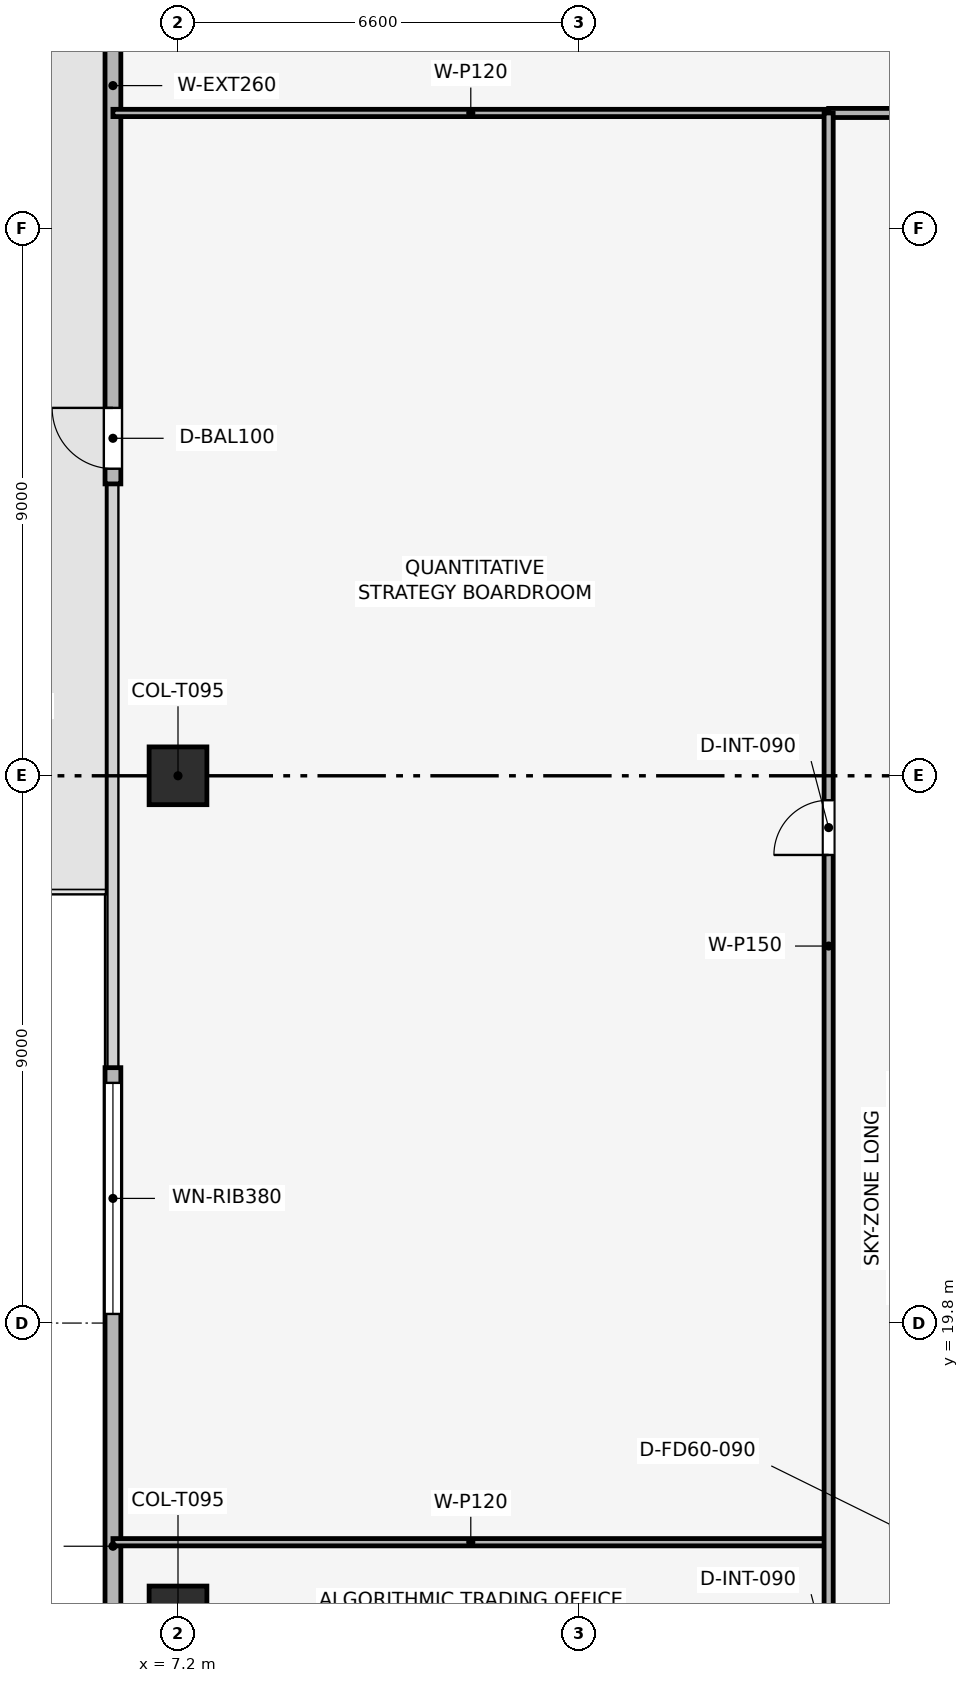
"""IFC4 building model, lengths in metres.
Left out: names, types, materials, properties, quantities, classifications, styles, units other than length and angle.
Written with IfcOpenShell. Run it as: python <this file> out.ifc"""

import sys

from ifc_helpers import new_model, si_unit, direction, frame, frame_2d, origin, origin_2d, place, context, subcontext, project, spatial, rectangle, extrude, element, fill, save


model = new_model("IFC4")
c1 = context("Model", 3, precision=1e-05, world=origin(), true_north=direction((0.0, 1.0)))
c2 = subcontext(c1, "Body", "Model", "MODEL_VIEW")
j1 = project(units=[si_unit("LENGTHUNIT", "METRE"), si_unit("PLANEANGLEUNIT", "RADIAN")], contexts=[c1])
p1 = place(None, origin())
s1 = spatial("IfcSite", under=j1, at=p1, CompositionType="ELEMENT")
p2 = place(p1, origin())
s2 = spatial("IfcBuilding", under=s1, at=p2, CompositionType="ELEMENT")
p3 = place(p2, frame((0.0, 0.0, 325.5)))
s3 = spatial("IfcBuildingStorey", under=s2, at=p3, CompositionType="ELEMENT", Elevation=325.5)
for number, where, z_axis, x_axis in (
    (1, (7.2, 28.8, 0.003), (0.0, 0.0, 1.0), (1.0, 0.0, 0.0)),
    (2, (7.2, 15.0, 0.003), (0.0, 0.0, 1.0), (1.0, 0.0, 0.0)),
):
    element("IfcColumn", number, at=place(p3, frame(where, z_axis=z_axis, x_axis=x_axis)), inside=s3, PredefinedType="COLUMN", context=c2, shape_type="SweptSolid", body=[
        extrude(rectangle(XDim=0.95, YDim=0.95, at=origin_2d()), origin(), (0.0, 0.0, 1.0), 3.504),
    ])
p4 = place(p3, frame((6.13, 12.3, 0.0), z_axis=(0.0, 0.0, 1.0), x_axis=(0.0, 1.0, 0.0)))
e3 = element("IfcWall", 3, at=p4, inside=s3, PredefinedType="SOLIDWALL", context=c2, shape_type="SweptSolid", body=[
    extrude(rectangle(XDim=11.7, YDim=0.26, at=frame_2d((5.85, 0.0))), origin(), (0.0, 0.0, 1.0), 3.51),
])
p5 = place(p4, frame((7.65, 0.0, 0.9)))
e4 = element("IfcOpeningElement", 4, at=p5, cuts=e3, PredefinedType="OPENING", context=c2, shape_type="SweptSolid", body=[
    extrude(rectangle(XDim=3.8, YDim=1.9, at=frame_2d((1.9, 0.95))), frame((0.0, 0.14, 0.0), z_axis=(0.0, -1.0, 0.0), x_axis=(1.0, 0.0, 0.0)), (0.0, 0.0, 1.0), 0.28),
])
p6 = place(p3, frame((6.13, 33.6, 0.0), z_axis=(0.0, 0.0, 1.0), x_axis=(0.0, 1.0, 0.0)))
e5 = element("IfcWall", 5, at=p6, inside=s3, PredefinedType="SOLIDWALL", context=c2, shape_type="SweptSolid", body=[
    extrude(rectangle(XDim=11.7, YDim=0.26, at=frame_2d((5.85, 0.0))), origin(), (0.0, 0.0, 1.0), 3.51),
])
p7 = place(p6, frame((0.25, 0.0, 0.0)))
e6 = element("IfcOpeningElement", 6, at=p7, cuts=e5, PredefinedType="OPENING", context=c2, shape_type="SweptSolid", body=[
    extrude(rectangle(XDim=1.0, YDim=2.2, at=frame_2d((0.5, 1.1))), frame((0.0, 0.14, 0.0), z_axis=(0.0, -1.0, 0.0), x_axis=(1.0, 0.0, 0.0)), (0.0, 0.0, 1.0), 0.28),
])
for number, where, z_axis, x_axis in (
    (7, (6.13, 16.196, 0.0), (0.0, 0.0, 1.0), (1.0, 0.0, 0.0)),
    (8, (6.13, 39.7, 0.0), (0.0, 0.0, 1.0), (1.0, 0.0, 0.0)),
):
    element("IfcWall", number, at=place(p3, frame(where, z_axis=z_axis, x_axis=x_axis)), inside=s3, PredefinedType="PARTITIONING", context=c2, shape_type="SweptSolid", body=[
        extrude(rectangle(XDim=11.77, YDim=0.12, at=frame_2d((5.885, 0.0))), origin(), (0.0, 0.0, 1.0), 3.095),
    ])
p8 = place(p3, frame((17.9, 39.7, 0.0), z_axis=(0.0, 0.0, 1.0), x_axis=(1.0, 0.0, 0.0)))
e9 = element("IfcWall", 9, at=p8, inside=s3, PredefinedType="PARTITIONING", context=c2, shape_type="SweptSolid", body=[
    extrude(rectangle(XDim=21.8, YDim=0.15, at=frame_2d((10.9, 0.0))), origin(), (0.0, 0.0, 1.0), 3.095),
])
p9 = place(p8, frame((10.45, 0.0, 0.0)))
e10 = element("IfcOpeningElement", 10, at=p9, cuts=e9, PredefinedType="OPENING", context=c2, shape_type="SweptSolid", body=[
    extrude(rectangle(XDim=0.9, YDim=2.1, at=frame_2d((0.45, 1.05))), frame((0.0, 0.085, 0.0), z_axis=(0.0, -1.0, 0.0), x_axis=(1.0, 0.0, 0.0)), (0.0, 0.0, 1.0), 0.17),
])
p10 = place(p3, frame((17.9, 12.3, 0.0), z_axis=(0.0, 0.0, 1.0), x_axis=(0.0, 1.0, 0.0)))
e11 = element("IfcWall", 11, at=p10, inside=s3, PredefinedType="PARTITIONING", context=c2, shape_type="SweptSolid", body=[
    extrude(rectangle(XDim=27.4, YDim=0.15, at=frame_2d((13.7, 0.0))), origin(), (0.0, 0.0, 1.0), 3.095),
])
p11 = place(p10, frame((1.498, 0.0, 0.0)))
e12 = element("IfcOpeningElement", 12, at=p11, cuts=e11, PredefinedType="OPENING", context=c2, shape_type="SweptSolid", body=[
    extrude(rectangle(XDim=0.9, YDim=2.1, at=frame_2d((0.45, 1.05))), frame((0.0, 0.085, 0.0), z_axis=(0.0, -1.0, 0.0), x_axis=(1.0, 0.0, 0.0)), (0.0, 0.0, 1.0), 0.17),
])
p12 = place(p10, frame((15.198, 0.0, 0.0)))
e13 = element("IfcOpeningElement", 13, at=p12, cuts=e11, PredefinedType="OPENING", context=c2, shape_type="SweptSolid", body=[
    extrude(rectangle(XDim=0.9, YDim=2.1, at=frame_2d((0.45, 1.05))), frame((0.0, 0.085, 0.0), z_axis=(0.0, -1.0, 0.0), x_axis=(1.0, 0.0, 0.0)), (0.0, 0.0, 1.0), 0.17),
])
p13 = place(p7, origin())
e14 = element("IfcDoor", 14, at=p13, inside=s3, OperationType="SINGLE_SWING_RIGHT", PredefinedType="DOOR", context=c2, shape_type="SweptSolid", body=[
    extrude(rectangle(XDim=1.0, YDim=2.2, at=frame_2d((0.5, 1.1))), frame((0.0, 0.025, 0.0), z_axis=(0.0, -1.0, 0.0), x_axis=(1.0, 0.0, 0.0)), (0.0, 0.0, 1.0), 0.05),
])
fill(e6, e14)
p14 = place(p5, origin())
e15 = element("IfcWindow", 15, at=p14, inside=s3, PartitioningType="SINGLE_PANEL", PredefinedType="WINDOW", context=c2, shape_type="SweptSolid", body=[
    extrude(rectangle(XDim=3.8, YDim=1.9, at=frame_2d((1.9, 0.95))), frame((0.0, 0.03, 0.0), z_axis=(0.0, -1.0, 0.0), x_axis=(1.0, 0.0, 0.0)), (0.0, 0.0, 1.0), 0.06),
])
fill(e4, e15)
p15 = place(p12, origin())
e16 = element("IfcDoor", 16, at=p15, inside=s3, OperationType="SINGLE_SWING_LEFT", PredefinedType="DOOR", context=c2, shape_type="SweptSolid", body=[
    extrude(rectangle(XDim=0.9, YDim=2.1, at=frame_2d((0.45, 1.05))), frame((0.0, 0.025, 0.0), z_axis=(0.0, -1.0, 0.0), x_axis=(1.0, 0.0, 0.0)), (0.0, 0.0, 1.0), 0.05),
])
fill(e13, e16)
save(model, sys.argv[1])
